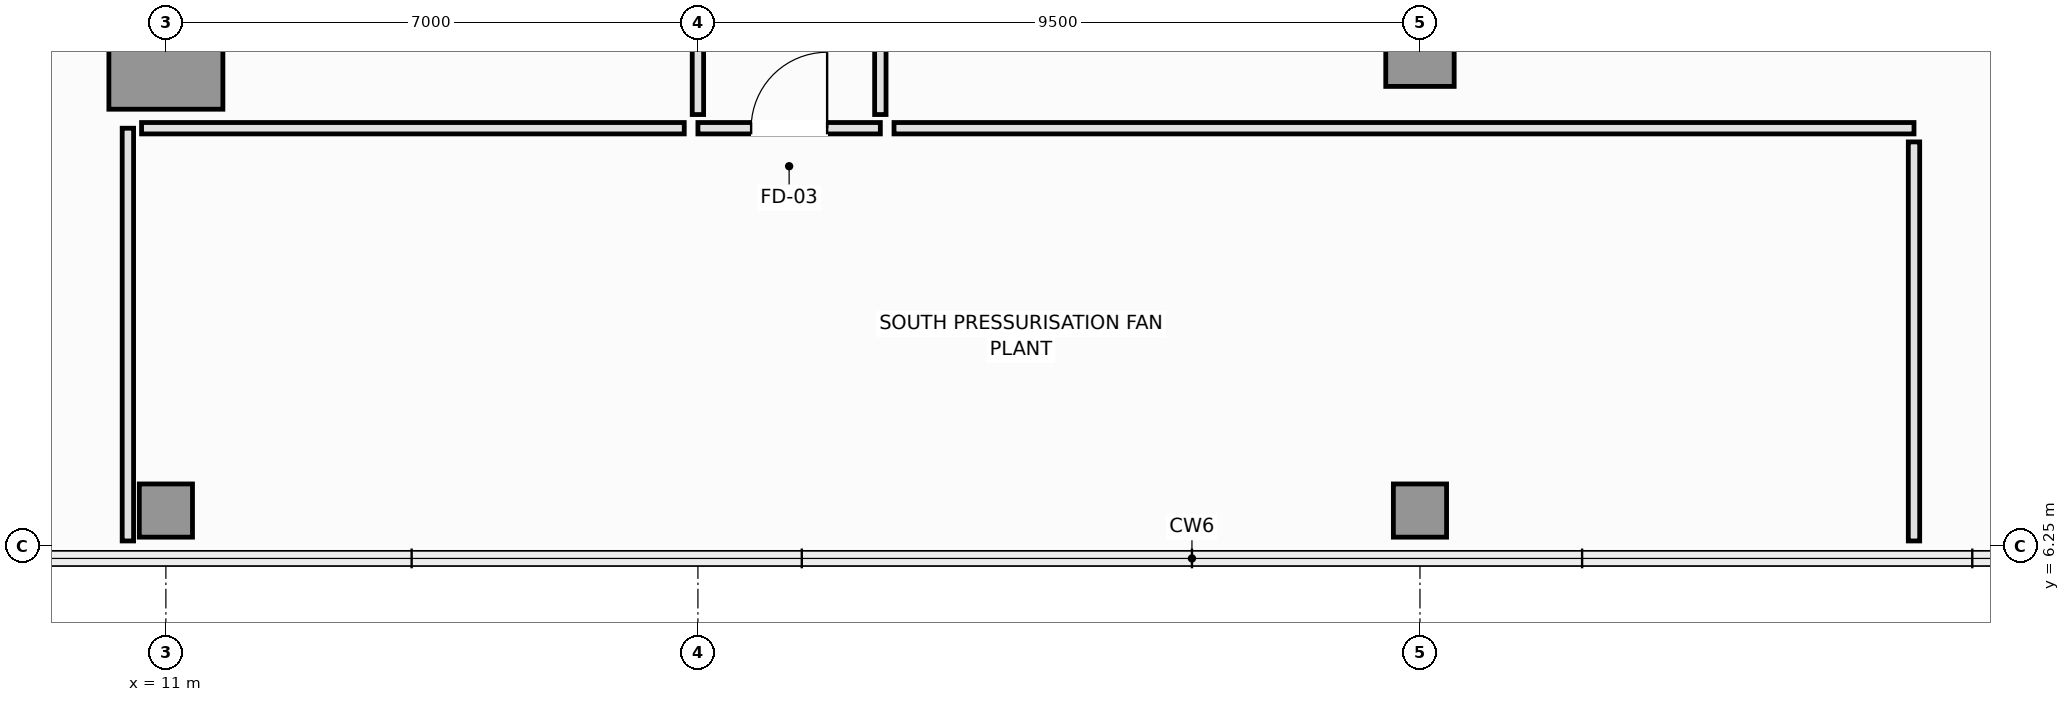
"""IFC4 building model, lengths in metres.
Left out: names, types, materials, properties, quantities, classifications, styles, units other than length and angle.
Written with IfcOpenShell. Run it as: python <this file> out.ifc"""

import sys

from ifc_helpers import new_model, si_unit, direction, frame, frame_2d, origin, origin_2d, place, context, subcontext, project, spatial, rectangle, extrude, element, fill, save


model = new_model("IFC4")
c1 = context("Model", 3, precision=1e-05, world=origin(), true_north=direction((0.0, 1.0)))
c2 = subcontext(c1, "Body", "Model", "MODEL_VIEW")
j1 = project(units=[si_unit("LENGTHUNIT", "METRE"), si_unit("PLANEANGLEUNIT", "RADIAN")], contexts=[c1])
p1 = place(None, origin())
s1 = spatial("IfcSite", under=j1, at=p1, CompositionType="ELEMENT")
p2 = place(p1, origin())
s2 = spatial("IfcBuilding", under=s1, at=p2, CompositionType="ELEMENT")
p3 = place(p2, frame((0.0, 0.0, 296.65)))
s3 = spatial("IfcBuildingStorey", under=s2, at=p3, CompositionType="ELEMENT", Elevation=296.65)
p4 = place(p3, frame((11.0, 12.75, 0.0), z_axis=(0.0, 0.0, 1.0), x_axis=(1.0, 0.0, 0.0)))
e1 = element("IfcColumn", 1, at=p4, inside=s3, PredefinedType="COLUMN", context=c2, shape_type="SweptSolid", body=[
    extrude(rectangle(XDim=1.5, YDim=1.5, at=origin_2d()), origin(), (0.0, 0.0, 1.0), 6.4),
])
p5 = place(p3, frame((27.5, 12.75, 0.0), z_axis=(0.0, 0.0, 1.0), x_axis=(1.0, 0.0, 0.0)))
e2 = element("IfcColumn", 2, at=p5, inside=s3, PredefinedType="COLUMN", context=c2, shape_type="SweptSolid", body=[
    extrude(rectangle(XDim=0.9, YDim=0.9, at=origin_2d()), origin(), (0.0, 0.0, 1.0), 6.4),
])
for number, where, z_axis, x_axis in (
    (3, (11.0, 6.72, 0.0), (0.0, 0.0, 1.0), (1.0, 0.0, 0.0)),
    (4, (27.5, 6.72, 0.0), (0.0, 0.0, 1.0), (1.0, 0.0, 0.0)),
):
    element("IfcColumn", number, at=place(p3, frame(where, z_axis=z_axis, x_axis=x_axis)), inside=s3, PredefinedType="COLUMN", context=c2, shape_type="SweptSolid", body=[
        extrude(rectangle(XDim=0.7, YDim=0.7, at=origin_2d()), origin(), (0.0, 0.0, 1.0), 6.4),
    ])
p6 = place(p3, frame((18.0, 11.75, 0.0), z_axis=(0.0, 0.0, 1.0), x_axis=(1.0, 0.0, 0.0)))
e5 = element("IfcWall", 5, at=p6, inside=s3, PredefinedType="PARTITIONING", context=c2, shape_type="SweptSolid", body=[
    extrude(rectangle(XDim=2.4, YDim=0.15, at=frame_2d((1.2, 0.0))), origin(), (0.0, 0.0, 1.0), 6.2),
])
p7 = place(p6, frame((0.7, 0.0, 0.0)))
e6 = element("IfcOpeningElement", 6, at=p7, cuts=e5, PredefinedType="OPENING", context=c2, shape_type="SweptSolid", body=[
    extrude(rectangle(XDim=1.0, YDim=2.15, at=frame_2d((0.5, 1.075))), frame((0.0, 0.085, 0.0), z_axis=(0.0, -1.0, 0.0), x_axis=(1.0, 0.0, 0.0)), (0.0, 0.0, 1.0), 0.17),
])
p8 = place(p3, frame((20.4, 13.52, 0.0), z_axis=(0.0, 0.0, 1.0), x_axis=(0.0, -1.0, 0.0)))
e7 = element("IfcWall", 7, at=p8, inside=s3, PredefinedType="PARTITIONING", context=c2, shape_type="SweptSolid", body=[
    extrude(rectangle(XDim=1.59, YDim=0.15, at=frame_2d((0.795, 0.0))), origin(), (0.0, 0.0, 1.0), 6.2),
])
p9 = place(p3, frame((20.58, 11.75, 0.0), z_axis=(0.0, 0.0, 1.0), x_axis=(1.0, 0.0, 0.0)))
e8 = element("IfcWall", 8, at=p9, inside=s3, PredefinedType="PARTITIONING", context=c2, shape_type="SweptSolid", body=[
    extrude(rectangle(XDim=13.42, YDim=0.15, at=frame_2d((6.71, 0.0))), origin(), (0.0, 0.0, 1.0), 6.2),
])
p10 = place(p3, frame((34.0, 11.57, 0.0), z_axis=(0.0, 0.0, 1.0), x_axis=(0.0, -1.0, 0.0)))
e9 = element("IfcWall", 9, at=p10, inside=s3, PredefinedType="PARTITIONING", context=c2, shape_type="SweptSolid", body=[
    extrude(rectangle(XDim=5.25, YDim=0.15, at=frame_2d((2.625, 0.0))), origin(), (0.0, 0.0, 1.0), 6.2),
])
p11 = place(p3, frame((10.5, 6.32, 0.0), z_axis=(0.0, 0.0, 1.0), x_axis=(0.0, 1.0, 0.0)))
e10 = element("IfcWall", 10, at=p11, inside=s3, PredefinedType="PARTITIONING", context=c2, shape_type="SweptSolid", body=[
    extrude(rectangle(XDim=5.43, YDim=0.15, at=frame_2d((2.715, 0.0))), origin(), (0.0, 0.0, 1.0), 6.2),
])
p12 = place(p3, frame((10.68, 11.75, 0.0), z_axis=(0.0, 0.0, 1.0), x_axis=(1.0, 0.0, 0.0)))
e11 = element("IfcWall", 11, at=p12, inside=s3, PredefinedType="PARTITIONING", context=c2, shape_type="SweptSolid", body=[
    extrude(rectangle(XDim=7.14, YDim=0.15, at=frame_2d((3.57, 0.0))), origin(), (0.0, 0.0, 1.0), 6.2),
])
p13 = place(p3, frame((18.0, 11.93, 0.0), z_axis=(0.0, 0.0, 1.0), x_axis=(0.0, 1.0, 0.0)))
e12 = element("IfcWall", 12, at=p13, inside=s3, PredefinedType="PARTITIONING", context=c2, shape_type="SweptSolid", body=[
    extrude(rectangle(XDim=1.85, YDim=0.15, at=frame_2d((0.925, 0.0))), origin(), (0.0, 0.0, 1.0), 6.2),
])
p14 = place(p7, origin())
e13 = element("IfcDoor", 13, at=p14, inside=s3, OperationType="SINGLE_SWING_RIGHT", PredefinedType="DOOR", context=c2, shape_type="SweptSolid", body=[
    extrude(rectangle(XDim=1.0, YDim=2.15, at=frame_2d((0.5, 1.075))), frame((0.0, 0.025, 0.0), z_axis=(0.0, -1.0, 0.0), x_axis=(1.0, 0.0, 0.0)), (0.0, 0.0, 1.0), 0.05),
])
fill(e6, e13)
save(model, sys.argv[1])
